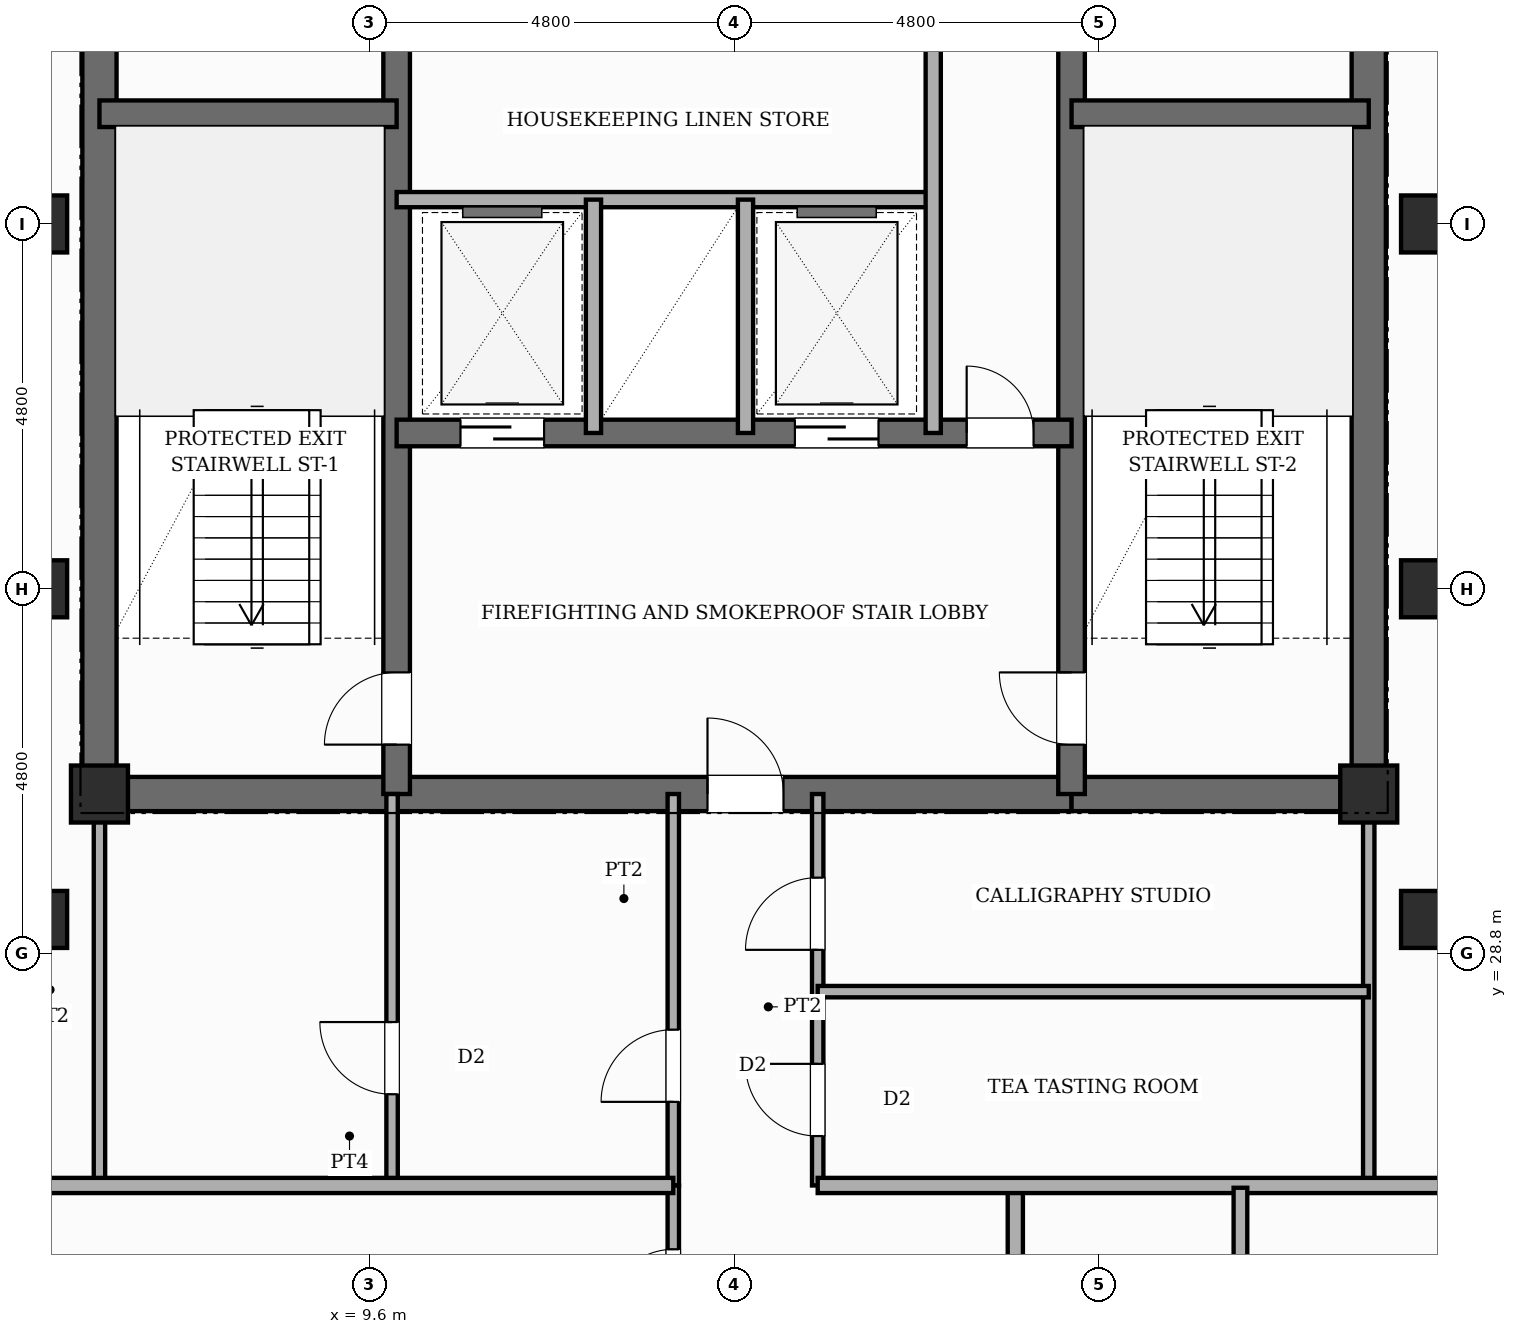
"""IFC4 building model, lengths in metres.
Left out: names, types, materials, properties, quantities, classifications, styles, units other than length and angle.
Written with IfcOpenShell. Run it as: python <this file> out.ifc"""

import sys

from ifc_helpers import new_model, si_unit, direction, frame, frame_2d, origin, origin_2d, place, context, subcontext, project, spatial, rectangle, extrude, element, fill, save


model = new_model("IFC4")
c1 = context("Model", 3, precision=1e-05, world=origin(), true_north=direction((0.0, 1.0)))
c2 = subcontext(c1, "Body", "Model", "MODEL_VIEW")
j1 = project(units=[si_unit("LENGTHUNIT", "METRE"), si_unit("PLANEANGLEUNIT", "RADIAN")], contexts=[c1])
p1 = place(None, origin())
s1 = spatial("IfcSite", under=j1, at=p1, CompositionType="ELEMENT")
p2 = place(p1, origin())
s2 = spatial("IfcBuilding", under=s1, at=p2, CompositionType="ELEMENT")
p3 = place(p2, frame((0.0, 0.0, 265.6)))
s3 = spatial("IfcBuildingStorey", under=s2, at=p3, CompositionType="ELEMENT", Elevation=265.6)
p4 = place(p3, frame((6.05, 30.675, 0.0), z_axis=(0.0, 0.0, 1.0), x_axis=(0.0, 1.0, 0.0)))
e1 = element("IfcWall", 1, at=p4, inside=s3, PredefinedType="SHEAR", context=c2, shape_type="SweptSolid", body=[
    extrude(rectangle(XDim=15.35, YDim=0.45, at=frame_2d((7.675, 0.0))), origin(), (0.0, 0.0, 1.0), 4.3),
])
p5 = place(p4, frame((10.675, 0.0, 0.0)))
e2 = element("IfcOpeningElement", 2, at=p5, cuts=e1, PredefinedType="OPENING", context=c2, shape_type="SweptSolid", body=[
    extrude(rectangle(XDim=0.95, YDim=2.15, at=frame_2d((0.475, 1.075))), frame((0.0, 0.235, 0.0), z_axis=(0.0, -1.0, 0.0), x_axis=(1.0, 0.0, 0.0)), (0.0, 0.0, 1.0), 0.47),
])
p6 = place(p3, frame((22.75, 30.675, 0.0), z_axis=(0.0, 0.0, 1.0), x_axis=(0.0, 1.0, 0.0)))
e3 = element("IfcWall", 3, at=p6, inside=s3, PredefinedType="SHEAR", context=c2, shape_type="SweptSolid", body=[
    extrude(rectangle(XDim=15.35, YDim=0.45, at=frame_2d((7.675, 0.0))), origin(), (0.0, 0.0, 1.0), 4.3),
])
p7 = place(p6, frame((10.675, 0.0, 0.0)))
e4 = element("IfcOpeningElement", 4, at=p7, cuts=e3, PredefinedType="OPENING", context=c2, shape_type="SweptSolid", body=[
    extrude(rectangle(XDim=1.0, YDim=2.15, at=frame_2d((0.5, 1.075))), frame((0.0, 0.235, 0.0), z_axis=(0.0, -1.0, 0.0), x_axis=(1.0, 0.0, 0.0)), (0.0, 0.0, 1.0), 0.47),
])
p8 = place(p3, frame((6.05, 30.9, 0.0), z_axis=(0.0, 0.0, 1.0), x_axis=(1.0, 0.0, 0.0)))
e5 = element("IfcWall", 5, at=p8, inside=s3, PredefinedType="SHEAR", context=c2, shape_type="SweptSolid", body=[
    extrude(rectangle(XDim=3.91, YDim=0.45, at=frame_2d((1.955, 0.0))), origin(), (0.0, 0.0, 1.0), 4.3),
])
p9 = place(p3, frame((9.96, 30.9, 0.0), z_axis=(0.0, 0.0, 1.0), x_axis=(1.0, 0.0, 0.0)))
e6 = element("IfcWall", 6, at=p9, inside=s3, PredefinedType="SHEAR", context=c2, shape_type="SweptSolid", body=[
    extrude(rectangle(XDim=8.88, YDim=0.45, at=frame_2d((4.44, 0.0))), origin(), (0.0, 0.0, 1.0), 4.3),
])
p10 = place(p9, frame((4.09, 0.0, 0.0)))
e7 = element("IfcOpeningElement", 7, at=p10, cuts=e6, PredefinedType="OPENING", context=c2, shape_type="SweptSolid", body=[
    extrude(rectangle(XDim=1.0, YDim=2.15, at=frame_2d((0.5, 1.075))), frame((0.0, 0.235, 0.0), z_axis=(0.0, -1.0, 0.0), x_axis=(1.0, 0.0, 0.0)), (0.0, 0.0, 1.0), 0.47),
])
p11 = place(p3, frame((18.84, 30.9, 0.0), z_axis=(0.0, 0.0, 1.0), x_axis=(1.0, 0.0, 0.0)))
e8 = element("IfcWall", 8, at=p11, inside=s3, PredefinedType="SHEAR", context=c2, shape_type="SweptSolid", body=[
    extrude(rectangle(XDim=3.91, YDim=0.45, at=frame_2d((1.955, 0.0))), origin(), (0.0, 0.0, 1.0), 4.3),
])
p12 = place(p3, frame((9.96, 30.9, 0.0), z_axis=(0.0, 0.0, 1.0), x_axis=(0.0, 1.0, 0.0)))
e9 = element("IfcWall", 9, at=p12, inside=s3, PredefinedType="SHEAR", context=c2, shape_type="SweptSolid", body=[
    extrude(rectangle(XDim=14.9, YDim=0.35, at=frame_2d((7.45, 0.0))), origin(), (0.0, 0.0, 1.0), 4.3),
])
p13 = place(p12, frame((0.65, 0.0, 0.0)))
e10 = element("IfcOpeningElement", 10, at=p13, cuts=e9, PredefinedType="OPENING", context=c2, shape_type="SweptSolid", body=[
    extrude(rectangle(XDim=0.95, YDim=2.1, at=frame_2d((0.475, 1.05))), frame((0.0, 0.185, 0.0), z_axis=(0.0, -1.0, 0.0), x_axis=(1.0, 0.0, 0.0)), (0.0, 0.0, 1.0), 0.37),
])
p14 = place(p12, frame((10.45, 0.0, 0.0)))
e11 = element("IfcOpeningElement", 11, at=p14, cuts=e9, PredefinedType="OPENING", context=c2, shape_type="SweptSolid", body=[
    extrude(rectangle(XDim=1.0, YDim=2.15, at=frame_2d((0.5, 1.075))), frame((0.0, 0.185, 0.0), z_axis=(0.0, -1.0, 0.0), x_axis=(1.0, 0.0, 0.0)), (0.0, 0.0, 1.0), 0.37),
])
p15 = place(p3, frame((18.84, 30.9, 0.0), z_axis=(0.0, 0.0, 1.0), x_axis=(0.0, 1.0, 0.0)))
e12 = element("IfcWall", 12, at=p15, inside=s3, PredefinedType="SHEAR", context=c2, shape_type="SweptSolid", body=[
    extrude(rectangle(XDim=14.9, YDim=0.35, at=frame_2d((7.45, 0.0))), origin(), (0.0, 0.0, 1.0), 4.3),
])
p16 = place(p15, frame((0.65, 0.0, 0.0)))
e13 = element("IfcOpeningElement", 13, at=p16, cuts=e12, PredefinedType="OPENING", context=c2, shape_type="SweptSolid", body=[
    extrude(rectangle(XDim=0.95, YDim=2.1, at=frame_2d((0.475, 1.05))), frame((0.0, 0.185, 0.0), z_axis=(0.0, -1.0, 0.0), x_axis=(1.0, 0.0, 0.0)), (0.0, 0.0, 1.0), 0.37),
])
p17 = place(p15, frame((10.45, 0.0, 0.0)))
e14 = element("IfcOpeningElement", 14, at=p17, cuts=e12, PredefinedType="OPENING", context=c2, shape_type="SweptSolid", body=[
    extrude(rectangle(XDim=1.0, YDim=2.15, at=frame_2d((0.5, 1.075))), frame((0.0, 0.185, 0.0), z_axis=(0.0, -1.0, 0.0), x_axis=(1.0, 0.0, 0.0)), (0.0, 0.0, 1.0), 0.37),
])
for number, where, z_axis, x_axis in (
    (15, (6.05, 39.85, 0.0), (0.0, 0.0, 1.0), (1.0, 0.0, 0.0)),
    (16, (18.84, 39.85, 0.0), (0.0, 0.0, 1.0), (1.0, 0.0, 0.0)),
):
    element("IfcWall", number, at=place(p3, frame(where, z_axis=z_axis, x_axis=x_axis)), inside=s3, PredefinedType="SHEAR", context=c2, shape_type="SweptSolid", body=[
        extrude(rectangle(XDim=3.91, YDim=0.35, at=frame_2d((1.955, 0.0))), origin(), (0.0, 0.0, 1.0), 4.3),
    ])
p18 = place(p3, frame((9.96, 35.65, 0.0), z_axis=(0.0, 0.0, 1.0), x_axis=(1.0, 0.0, 0.0)))
e17 = element("IfcWall", 17, at=p18, inside=s3, PredefinedType="SHEAR", context=c2, shape_type="SweptSolid", body=[
    extrude(rectangle(XDim=8.88, YDim=0.35, at=frame_2d((4.44, 0.0))), origin(), (0.0, 0.0, 1.0), 4.3),
])
p19 = place(p18, frame((0.84, 0.0, 0.0)))
e18 = element("IfcOpeningElement", 18, at=p19, cuts=e17, PredefinedType="OPENING", context=c2, shape_type="SweptSolid", body=[
    extrude(rectangle(XDim=1.1, YDim=2.15, at=frame_2d((0.55, 1.075))), frame((0.0, 0.185, 0.0), z_axis=(0.0, -1.0, 0.0), x_axis=(1.0, 0.0, 0.0)), (0.0, 0.0, 1.0), 0.37),
])
p20 = place(p18, frame((5.24, 0.0, 0.0)))
e19 = element("IfcOpeningElement", 19, at=p20, cuts=e17, PredefinedType="OPENING", context=c2, shape_type="SweptSolid", body=[
    extrude(rectangle(XDim=1.1, YDim=2.15, at=frame_2d((0.55, 1.075))), frame((0.0, 0.185, 0.0), z_axis=(0.0, -1.0, 0.0), x_axis=(1.0, 0.0, 0.0)), (0.0, 0.0, 1.0), 0.37),
])
p21 = place(p18, frame((7.5, 0.0, 0.0)))
e20 = element("IfcOpeningElement", 20, at=p21, cuts=e17, PredefinedType="OPENING", context=c2, shape_type="SweptSolid", body=[
    extrude(rectangle(XDim=0.88, YDim=2.1, at=frame_2d((0.44, 1.05))), frame((0.0, 0.185, 0.0), z_axis=(0.0, -1.0, 0.0), x_axis=(1.0, 0.0, 0.0)), (0.0, 0.0, 1.0), 0.37),
])
for number, where, z_axis, x_axis in (
    (21, (5.25, 29.25, 0.0), (0.0, 0.0, 1.0), (1.0, 0.0, 0.0)),
    (22, (5.25, 33.6, 0.0), (0.0, 0.0, 1.0), (1.0, 0.0, 0.0)),
    (23, (5.25, 38.4, 0.0), (0.0, 0.0, 1.0), (1.0, 0.0, 0.0)),
    (24, (6.05, 30.9, 0.0), (0.0, 0.0, 1.0), (1.0, 0.0, 0.0)),
    (25, (22.75, 30.9, 0.0), (0.0, 0.0, 1.0), (1.0, 0.0, 0.0)),
    (26, (23.55, 29.25, 0.0), (0.0, 0.0, 1.0), (1.0, 0.0, 0.0)),
    (27, (23.55, 33.6, 0.0), (0.0, 0.0, 1.0), (1.0, 0.0, 0.0)),
    (28, (23.55, 38.4, 0.0), (0.0, 0.0, 1.0), (1.0, 0.0, 0.0)),
):
    element("IfcColumn", number, at=place(p3, frame(where, z_axis=z_axis, x_axis=x_axis)), inside=s3, PredefinedType="COLUMN", context=c2, shape_type="SweptSolid", body=[
        extrude(rectangle(XDim=0.75, YDim=0.75, at=origin_2d()), origin(), (0.0, 0.0, 1.0), 4.3),
    ])
p22 = place(p3, frame((9.96, 38.72, 0.0), z_axis=(0.0, 0.0, 1.0), x_axis=(1.0, 0.0, 0.0)))
e29 = element("IfcWall", 29, at=p22, inside=s3, PredefinedType="POLYGONAL", context=c2, shape_type="SweptSolid", body=[
    extrude(rectangle(XDim=7.06, YDim=0.2, at=frame_2d((3.53, 0.0))), origin(), (0.0, 0.0, 1.0), 4.04),
])
for number, where, z_axis, x_axis in (
    (30, (12.55, 35.65, 0.0), (0.0, 0.0, 1.0), (0.0, 1.0, 0.0)),
    (31, (14.55, 35.65, 0.0), (0.0, 0.0, 1.0), (0.0, 1.0, 0.0)),
):
    element("IfcWall", number, at=place(p3, frame(where, z_axis=z_axis, x_axis=x_axis)), inside=s3, PredefinedType="POLYGONAL", context=c2, shape_type="SweptSolid", body=[
        extrude(rectangle(XDim=3.07, YDim=0.2, at=frame_2d((1.535, 0.0))), origin(), (0.0, 0.0, 1.0), 4.04),
    ])
p23 = place(p3, frame((17.02, 35.65, 0.0), z_axis=(0.0, 0.0, 1.0), x_axis=(0.0, 1.0, 0.0)))
e32 = element("IfcWall", 32, at=p23, inside=s3, PredefinedType="POLYGONAL", context=c2, shape_type="SweptSolid", body=[
    extrude(rectangle(XDim=5.15, YDim=0.2, at=frame_2d((2.575, 0.0))), origin(), (0.0, 0.0, 1.0), 4.04),
])
p24 = place(p3, frame((13.6, 25.75, 0.0), z_axis=(0.0, 0.0, 1.0), x_axis=(0.0, 1.0, 0.0)))
e33 = element("IfcWall", 33, at=p24, inside=s3, PredefinedType="PARTITIONING", context=c2, shape_type="SweptSolid", body=[
    extrude(rectangle(XDim=5.15, YDim=0.15, at=frame_2d((2.575, 0.0))), origin(), (0.0, 0.0, 1.0), 4.04),
])
p25 = place(p24, frame((1.1, 0.0, 0.0)))
e34 = element("IfcOpeningElement", 34, at=p25, cuts=e33, PredefinedType="OPENING", context=c2, shape_type="SweptSolid", body=[
    extrude(rectangle(XDim=0.95, YDim=2.15, at=frame_2d((0.475, 1.075))), frame((0.0, 0.085, 0.0), z_axis=(0.0, -1.0, 0.0), x_axis=(1.0, 0.0, 0.0)), (0.0, 0.0, 1.0), 0.17),
])
p26 = place(p3, frame((15.5, 25.75, 0.0), z_axis=(0.0, 0.0, 1.0), x_axis=(0.0, 1.0, 0.0)))
e35 = element("IfcWall", 35, at=p26, inside=s3, PredefinedType="PARTITIONING", context=c2, shape_type="SweptSolid", body=[
    extrude(rectangle(XDim=5.15, YDim=0.15, at=frame_2d((2.575, 0.0))), origin(), (0.0, 0.0, 1.0), 4.04),
])
p27 = place(p26, frame((0.65, 0.0, 0.0)))
e36 = element("IfcOpeningElement", 36, at=p27, cuts=e35, PredefinedType="OPENING", context=c2, shape_type="SweptSolid", body=[
    extrude(rectangle(XDim=0.95, YDim=2.15, at=frame_2d((0.475, 1.075))), frame((0.0, 0.085, 0.0), z_axis=(0.0, -1.0, 0.0), x_axis=(1.0, 0.0, 0.0)), (0.0, 0.0, 1.0), 0.17),
])
p28 = place(p26, frame((3.1, 0.0, 0.0)))
e37 = element("IfcOpeningElement", 37, at=p28, cuts=e35, PredefinedType="OPENING", context=c2, shape_type="SweptSolid", body=[
    extrude(rectangle(XDim=0.95, YDim=2.15, at=frame_2d((0.475, 1.075))), frame((0.0, 0.085, 0.0), z_axis=(0.0, -1.0, 0.0), x_axis=(1.0, 0.0, 0.0)), (0.0, 0.0, 1.0), 0.17),
])
for number, where, z_axis, x_axis in (
    (38, (6.05, 25.75, 0.0), (0.0, 0.0, 1.0), (0.0, 1.0, 0.0)),
    (39, (22.75, 25.75, 0.0), (0.0, 0.0, 1.0), (0.0, 1.0, 0.0)),
):
    element("IfcWall", number, at=place(p3, frame(where, z_axis=z_axis, x_axis=x_axis)), inside=s3, PredefinedType="PARTITIONING", context=c2, shape_type="SweptSolid", body=[
        extrude(rectangle(XDim=5.15, YDim=0.15, at=frame_2d((2.575, 0.0))), origin(), (0.0, 0.0, 1.0), 4.04),
    ])
p29 = place(p3, frame((9.9, 25.75, 0.0), z_axis=(0.0, 0.0, 1.0), x_axis=(0.0, 1.0, 0.0)))
e40 = element("IfcWall", 40, at=p29, inside=s3, PredefinedType="PARTITIONING", context=c2, shape_type="SweptSolid", body=[
    extrude(rectangle(XDim=5.15, YDim=0.15, at=frame_2d((2.575, 0.0))), origin(), (0.0, 0.0, 1.0), 4.04),
])
p30 = place(p29, frame((1.2, 0.0, 0.0)))
e41 = element("IfcOpeningElement", 41, at=p30, cuts=e40, PredefinedType="OPENING", context=c2, shape_type="SweptSolid", body=[
    extrude(rectangle(XDim=0.95, YDim=2.15, at=frame_2d((0.475, 1.075))), frame((0.0, 0.085, 0.0), z_axis=(0.0, -1.0, 0.0), x_axis=(1.0, 0.0, 0.0)), (0.0, 0.0, 1.0), 0.17),
])
p31 = place(p3, frame((15.5, 28.3, 0.0), z_axis=(0.0, 0.0, 1.0), x_axis=(1.0, 0.0, 0.0)))
e42 = element("IfcWall", 42, at=p31, inside=s3, PredefinedType="PARTITIONING", context=c2, shape_type="SweptSolid", body=[
    extrude(rectangle(XDim=7.25, YDim=0.15, at=frame_2d((3.625, 0.0))), origin(), (0.0, 0.0, 1.0), 4.04),
])
p32 = place(p3, frame((18.1, 11.08, 0.0), z_axis=(0.0, 0.0, 1.0), x_axis=(0.0, 1.0, 0.0)))
e43 = element("IfcWall", 43, at=p32, inside=s3, PredefinedType="PARTITIONING", context=c2, shape_type="SweptSolid", body=[
    extrude(rectangle(XDim=14.67, YDim=0.2, at=frame_2d((7.335, 0.0))), origin(), (0.0, 0.0, 1.0), 4.04),
])
p33 = place(p32, frame((1.35, 0.0, 0.0)))
e44 = element("IfcOpeningElement", 44, at=p33, cuts=e43, PredefinedType="OPENING", context=c2, shape_type="SweptSolid", body=[
    extrude(rectangle(XDim=0.98, YDim=2.18, at=frame_2d((0.49, 1.09))), frame((0.0, 0.11, 0.0), z_axis=(0.0, -1.0, 0.0), x_axis=(1.0, 0.0, 0.0)), (0.0, 0.0, 1.0), 0.22),
])
p34 = place(p32, frame((4.596, 0.0, 0.0)))
e45 = element("IfcOpeningElement", 45, at=p34, cuts=e43, PredefinedType="OPENING", context=c2, shape_type="SweptSolid", body=[
    extrude(rectangle(XDim=0.98, YDim=2.18, at=frame_2d((0.49, 1.09))), frame((0.0, 0.11, 0.0), z_axis=(0.0, -1.0, 0.0), x_axis=(1.0, 0.0, 0.0)), (0.0, 0.0, 1.0), 0.22),
])
p35 = place(p32, frame((10.196, 0.0, 0.0)))
e46 = element("IfcOpeningElement", 46, at=p35, cuts=e43, PredefinedType="OPENING", context=c2, shape_type="SweptSolid", body=[
    extrude(rectangle(XDim=0.98, YDim=2.18, at=frame_2d((0.49, 1.09))), frame((0.0, 0.11, 0.0), z_axis=(0.0, -1.0, 0.0), x_axis=(1.0, 0.0, 0.0)), (0.0, 0.0, 1.0), 0.22),
])
p36 = place(p3, frame((15.5, 25.75, 0.0), z_axis=(0.0, 0.0, 1.0), x_axis=(1.0, 0.0, 0.0)))
e47 = element("IfcWall", 47, at=p36, inside=s3, PredefinedType="PARTITIONING", context=c2, shape_type="SweptSolid", body=[
    extrude(rectangle(XDim=8.22, YDim=0.2, at=frame_2d((4.11, 0.0))), origin(), (0.0, 0.0, 1.0), 4.04),
])
p37 = place(p3, frame((13.6, 23.4, 0.0), z_axis=(0.0, 0.0, 1.0), x_axis=(0.0, 1.0, 0.0)))
e48 = element("IfcWall", 48, at=p37, inside=s3, PredefinedType="PARTITIONING", context=c2, shape_type="SweptSolid", body=[
    extrude(rectangle(XDim=2.35, YDim=0.15, at=frame_2d((1.175, 0.0))), origin(), (0.0, 0.0, 1.0), 4.04),
])
p38 = place(p37, frame((0.65, 0.0, 0.0)))
e49 = element("IfcOpeningElement", 49, at=p38, cuts=e48, PredefinedType="OPENING", context=c2, shape_type="SweptSolid", body=[
    extrude(rectangle(XDim=0.86, YDim=2.1, at=frame_2d((0.43, 1.05))), frame((0.0, 0.085, 0.0), z_axis=(0.0, -1.0, 0.0), x_axis=(1.0, 0.0, 0.0)), (0.0, 0.0, 1.0), 0.17),
])
p39 = place(p3, frame((5.08, 25.75, 0.0), z_axis=(0.0, 0.0, 1.0), x_axis=(1.0, 0.0, 0.0)))
e50 = element("IfcWall", 50, at=p39, inside=s3, PredefinedType="PARTITIONING", context=c2, shape_type="SweptSolid", body=[
    extrude(rectangle(XDim=8.52, YDim=0.2, at=frame_2d((4.26, 0.0))), origin(), (0.0, 0.0, 1.0), 4.04),
])
p40 = place(p3, frame((21.062, 23.092, 0.0), z_axis=(0.0, 0.0, 1.0), x_axis=(0.0, 1.0, 0.0)))
e51 = element("IfcWall", 51, at=p40, inside=s3, PredefinedType="PLUMBINGWALL", context=c2, shape_type="SweptSolid", body=[
    extrude(rectangle(XDim=2.628, YDim=0.18, at=frame_2d((1.314, 0.0))), origin(), (0.0, 0.0, 1.0), 4.04),
])
p41 = place(p13, origin())
e52 = element("IfcDoor", 52, at=p41, inside=s3, OperationType="SINGLE_SWING_LEFT", PredefinedType="DOOR", context=c2, shape_type="SweptSolid", body=[
    extrude(rectangle(XDim=0.95, YDim=2.1, at=frame_2d((0.475, 1.05))), frame((0.0, 0.025, 0.0), z_axis=(0.0, -1.0, 0.0), x_axis=(1.0, 0.0, 0.0)), (0.0, 0.0, 1.0), 0.05),
])
fill(e10, e52)
p42 = place(p16, origin())
e53 = element("IfcDoor", 53, at=p42, inside=s3, OperationType="SINGLE_SWING_RIGHT", PredefinedType="DOOR", context=c2, shape_type="SweptSolid", body=[
    extrude(rectangle(XDim=0.95, YDim=2.1, at=frame_2d((0.475, 1.05))), frame((0.0, 0.025, 0.0), z_axis=(0.0, -1.0, 0.0), x_axis=(1.0, 0.0, 0.0)), (0.0, 0.0, 1.0), 0.05),
])
fill(e13, e53)
p43 = place(p10, origin())
e54 = element("IfcDoor", 54, at=p43, inside=s3, OperationType="SINGLE_SWING_LEFT", PredefinedType="DOOR", context=c2, shape_type="SweptSolid", body=[
    extrude(rectangle(XDim=1.0, YDim=2.15, at=frame_2d((0.5, 1.075))), frame((0.0, 0.025, 0.0), z_axis=(0.0, -1.0, 0.0), x_axis=(1.0, 0.0, 0.0)), (0.0, 0.0, 1.0), 0.05),
])
fill(e7, e54)
p44 = place(p19, origin())
e55 = element("IfcDoor", 55, at=p44, inside=s3, OperationType="SLIDING_TO_LEFT", PredefinedType="DOOR", context=c2, shape_type="SweptSolid", body=[
    extrude(rectangle(XDim=1.1, YDim=2.15, at=frame_2d((0.55, 1.075))), frame((0.0, 0.025, 0.0), z_axis=(0.0, -1.0, 0.0), x_axis=(1.0, 0.0, 0.0)), (0.0, 0.0, 1.0), 0.05),
])
fill(e18, e55)
p45 = place(p20, origin())
e56 = element("IfcDoor", 56, at=p45, inside=s3, OperationType="SLIDING_TO_RIGHT", PredefinedType="DOOR", context=c2, shape_type="SweptSolid", body=[
    extrude(rectangle(XDim=1.1, YDim=2.15, at=frame_2d((0.55, 1.075))), frame((0.0, 0.025, 0.0), z_axis=(0.0, -1.0, 0.0), x_axis=(1.0, 0.0, 0.0)), (0.0, 0.0, 1.0), 0.05),
])
fill(e19, e56)
p46 = place(p21, origin())
e57 = element("IfcDoor", 57, at=p46, inside=s3, OperationType="SINGLE_SWING_LEFT", PredefinedType="DOOR", context=c2, shape_type="SweptSolid", body=[
    extrude(rectangle(XDim=0.88, YDim=2.1, at=frame_2d((0.44, 1.05))), frame((0.0, 0.025, 0.0), z_axis=(0.0, -1.0, 0.0), x_axis=(1.0, 0.0, 0.0)), (0.0, 0.0, 1.0), 0.05),
])
fill(e20, e57)
p47 = place(p25, origin())
e58 = element("IfcDoor", 58, at=p47, inside=s3, OperationType="SINGLE_SWING_LEFT", PredefinedType="DOOR", context=c2, shape_type="SweptSolid", body=[
    extrude(rectangle(XDim=0.95, YDim=2.15, at=frame_2d((0.475, 1.075))), frame((0.0, 0.025, 0.0), z_axis=(0.0, -1.0, 0.0), x_axis=(1.0, 0.0, 0.0)), (0.0, 0.0, 1.0), 0.05),
])
fill(e34, e58)
p48 = place(p30, origin())
e59 = element("IfcDoor", 59, at=p48, inside=s3, OperationType="SINGLE_SWING_RIGHT", PredefinedType="DOOR", context=c2, shape_type="SweptSolid", body=[
    extrude(rectangle(XDim=0.95, YDim=2.15, at=frame_2d((0.475, 1.075))), frame((0.0, 0.025, 0.0), z_axis=(0.0, -1.0, 0.0), x_axis=(1.0, 0.0, 0.0)), (0.0, 0.0, 1.0), 0.05),
])
fill(e41, e59)
p49 = place(p27, origin())
e60 = element("IfcDoor", 60, at=p49, inside=s3, OperationType="SINGLE_SWING_RIGHT", PredefinedType="DOOR", context=c2, shape_type="SweptSolid", body=[
    extrude(rectangle(XDim=0.95, YDim=2.15, at=frame_2d((0.475, 1.075))), frame((0.0, 0.025, 0.0), z_axis=(0.0, -1.0, 0.0), x_axis=(1.0, 0.0, 0.0)), (0.0, 0.0, 1.0), 0.05),
])
fill(e36, e60)
p50 = place(p28, origin())
e61 = element("IfcDoor", 61, at=p50, inside=s3, OperationType="SINGLE_SWING_LEFT", PredefinedType="DOOR", context=c2, shape_type="SweptSolid", body=[
    extrude(rectangle(XDim=0.95, YDim=2.15, at=frame_2d((0.475, 1.075))), frame((0.0, 0.025, 0.0), z_axis=(0.0, -1.0, 0.0), x_axis=(1.0, 0.0, 0.0)), (0.0, 0.0, 1.0), 0.05),
])
fill(e37, e61)
p51 = place(p38, origin())
e62 = element("IfcDoor", 62, at=p51, inside=s3, OperationType="SINGLE_SWING_LEFT", PredefinedType="DOOR", context=c2, shape_type="SweptSolid", body=[
    extrude(rectangle(XDim=0.86, YDim=2.1, at=frame_2d((0.43, 1.05))), frame((0.0, 0.025, 0.0), z_axis=(0.0, -1.0, 0.0), x_axis=(1.0, 0.0, 0.0)), (0.0, 0.0, 1.0), 0.05),
])
fill(e49, e62)
save(model, sys.argv[1])
